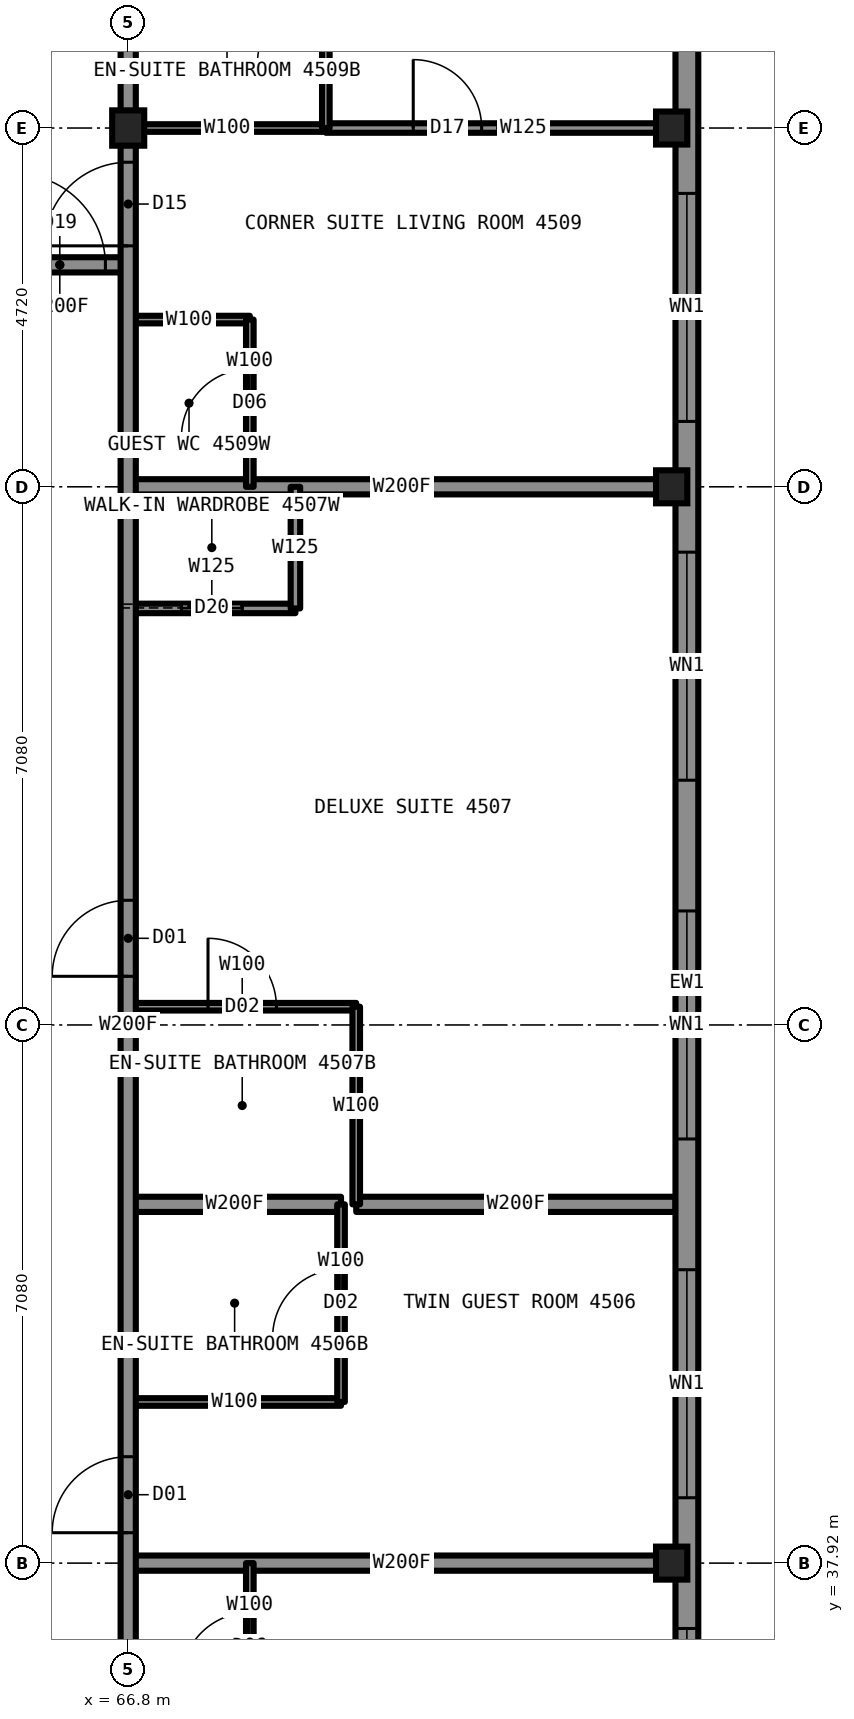
"""IFC4 building model, lengths in metres.
Left out: names, types, materials, properties, quantities, classifications, styles, units other than length and angle.
Written with IfcOpenShell. Run it as: python <this file> out.ifc"""

import sys

from ifc_helpers import new_model, si_unit, direction, frame, frame_2d, origin, origin_2d, place, context, subcontext, project, spatial, rectangle, i_section, extrude, element, fill, save


model = new_model("IFC4")
c1 = context("Model", 3, precision=1e-05, world=origin(), true_north=direction((0.0, 1.0)))
c2 = subcontext(c1, "Body", "Model", "MODEL_VIEW")
j1 = project(units=[si_unit("LENGTHUNIT", "METRE"), si_unit("PLANEANGLEUNIT", "RADIAN")], contexts=[c1])
p1 = place(None, origin())
s1 = spatial("IfcSite", under=j1, at=p1, CompositionType="ELEMENT")
p2 = place(p1, origin())
s2 = spatial("IfcBuilding", under=s1, at=p2, CompositionType="ELEMENT")
p3 = place(p2, frame((0.0, 0.0, 161.8)))
s3 = spatial("IfcBuildingStorey", under=s2, at=p3, CompositionType="ELEMENT", Elevation=161.8)
for number, where, z_axis, x_axis in (
    (1, (73.95, 37.92, 0.0), (0.0, 0.0, 1.0), (1.0, 0.0, 0.0)),
    (2, (73.95, 52.08, 0.0), (0.0, 0.0, 1.0), (1.0, 0.0, 0.0)),
    (3, (73.95, 56.8, 0.0), (0.0, 0.0, 1.0), (1.0, 0.0, 0.0)),
):
    element("IfcColumn", number, at=place(p3, frame(where, z_axis=z_axis, x_axis=x_axis)), inside=s3, PredefinedType="COLUMN", context=c2, shape_type="SweptSolid", body=[
        extrude(i_section(OverallWidth=0.442, OverallDepth=0.531, WebThickness=0.066, FlangeThickness=0.106, at=origin_2d()), origin(), (0.0, 0.0, 1.0), 3.5),
    ])
p4 = place(p3, frame((66.8, 56.8, 0.0), z_axis=(0.0, 0.0, 1.0), x_axis=(1.0, 0.0, 0.0)))
e4 = element("IfcColumn", 4, at=p4, inside=s3, PredefinedType="COLUMN", context=c2, shape_type="SweptSolid", body=[
    extrude(i_section(OverallWidth=0.422, OverallDepth=0.465, WebThickness=0.045, FlangeThickness=0.073, at=origin_2d()), origin(), (0.0, 0.0, 1.0), 3.5),
])
p5 = place(p3, frame((66.8, 42.64, 0.0), z_axis=(0.0, 0.0, 1.0), x_axis=(1.0, 0.0, 0.0)))
e5 = element("IfcWall", 5, at=p5, inside=s3, PredefinedType="PARTITIONING", context=c2, shape_type="SweptSolid", body=[
    extrude(rectangle(XDim=2.8, YDim=0.2, at=frame_2d((1.4, 0.0))), origin(), (0.0, 0.0, 1.0), 2.73),
])
p6 = place(p3, frame((69.8, 42.64, 0.0), z_axis=(0.0, 0.0, 1.0), x_axis=(1.0, 0.0, 0.0)))
e6 = element("IfcWall", 6, at=p6, inside=s3, PredefinedType="PARTITIONING", context=c2, shape_type="SweptSolid", body=[
    extrude(rectangle(XDim=4.2, YDim=0.2, at=frame_2d((2.1, 0.0))), origin(), (0.0, 0.0, 1.0), 2.73),
])
p7 = place(p3, frame((66.8, 40.04, 0.0), z_axis=(0.0, 0.0, 1.0), x_axis=(1.0, 0.0, 0.0)))
e7 = element("IfcWall", 7, at=p7, inside=s3, PredefinedType="PARTITIONING", context=c2, shape_type="SweptSolid", body=[
    extrude(rectangle(XDim=2.8, YDim=0.1, at=frame_2d((1.4, 0.0))), origin(), (0.0, 0.0, 1.0), 3.33),
])
p8 = place(p3, frame((66.8, 37.92, 0.0), z_axis=(0.0, 0.0, 1.0), x_axis=(1.0, 0.0, 0.0)))
e8 = element("IfcWall", 8, at=p8, inside=s3, PredefinedType="PARTITIONING", context=c2, shape_type="SweptSolid", body=[
    extrude(rectangle(XDim=7.2, YDim=0.2, at=frame_2d((3.6, 0.0))), origin(), (0.0, 0.0, 1.0), 2.573),
])
p9 = place(p3, frame((66.8, 45.24, 0.0), z_axis=(0.0, 0.0, 1.0), x_axis=(1.0, 0.0, 0.0)))
e9 = element("IfcWall", 9, at=p9, inside=s3, PredefinedType="PARTITIONING", context=c2, shape_type="SweptSolid", body=[
    extrude(rectangle(XDim=3.0, YDim=0.1, at=frame_2d((1.5, 0.0))), origin(), (0.0, 0.0, 1.0), 3.33),
])
p10 = place(p9, frame((1.05, 0.0, 0.0)))
e10 = element("IfcOpeningElement", 10, at=p10, cuts=e9, PredefinedType="OPENING", context=c2, shape_type="SweptSolid", body=[
    extrude(rectangle(XDim=0.9, YDim=2.1, at=frame_2d((0.45, 1.05))), frame((0.0, 0.06, 0.0), z_axis=(0.0, -1.0, 0.0), x_axis=(1.0, 0.0, 0.0)), (0.0, 0.0, 1.0), 0.12),
])
p11 = place(p3, frame((65.0, 55.0, 0.0), z_axis=(0.0, 0.0, 1.0), x_axis=(1.0, 0.0, 0.0)))
e11 = element("IfcWall", 11, at=p11, inside=s3, PredefinedType="PARTITIONING", context=c2, shape_type="SweptSolid", body=[
    extrude(rectangle(XDim=1.8, YDim=0.2, at=frame_2d((0.9, 0.0))), origin(), (0.0, 0.0, 1.0), 3.33),
])
p12 = place(p11, frame((0.3, 0.0, 0.0)))
e12 = element("IfcOpeningElement", 12, at=p12, cuts=e11, PredefinedType="OPENING", context=c2, shape_type="SweptSolid", body=[
    extrude(rectangle(XDim=1.2, YDim=2.2, at=frame_2d((0.6, 1.1))), frame((0.0, 0.11, 0.0), z_axis=(0.0, -1.0, 0.0), x_axis=(1.0, 0.0, 0.0)), (0.0, 0.0, 1.0), 0.22),
])
p13 = place(p3, frame((66.8, 56.8, 0.0), z_axis=(0.0, 0.0, 1.0), x_axis=(1.0, 0.0, 0.0)))
e13 = element("IfcWall", 13, at=p13, inside=s3, PredefinedType="PARTITIONING", context=c2, shape_type="SweptSolid", body=[
    extrude(rectangle(XDim=2.6, YDim=0.1, at=frame_2d((1.3, 0.0))), origin(), (0.0, 0.0, 1.0), 2.573),
])
p14 = place(p3, frame((69.4, 56.8, 0.0), z_axis=(0.0, 0.0, 1.0), x_axis=(1.0, 0.0, 0.0)))
e14 = element("IfcWall", 14, at=p14, inside=s3, PredefinedType="PARTITIONING", context=c2, shape_type="SweptSolid", body=[
    extrude(rectangle(XDim=4.6, YDim=0.125, at=frame_2d((2.3, 0.0))), origin(), (0.0, 0.0, 1.0), 2.573),
])
p15 = place(p14, frame((1.15, 0.0, 0.0)))
e15 = element("IfcOpeningElement", 15, at=p15, cuts=e14, PredefinedType="OPENING", context=c2, shape_type="SweptSolid", body=[
    extrude(rectangle(XDim=0.9, YDim=2.2, at=frame_2d((0.45, 1.1))), frame((0.0, 0.073, 0.0), z_axis=(0.0, -1.0, 0.0), x_axis=(1.0, 0.0, 0.0)), (0.0, 0.0, 1.0), 0.145),
])
p16 = place(p3, frame((66.8, 50.48, 0.0), z_axis=(0.0, 0.0, 1.0), x_axis=(1.0, 0.0, 0.0)))
e16 = element("IfcWall", 16, at=p16, inside=s3, PredefinedType="PARTITIONING", context=c2, shape_type="SweptSolid", body=[
    extrude(rectangle(XDim=2.2, YDim=0.125, at=frame_2d((1.1, 0.0))), origin(), (0.0, 0.0, 1.0), 3.33),
])
p17 = place(p16, frame((0.7, 0.0, 0.0)))
e17 = element("IfcOpeningElement", 17, at=p17, cuts=e16, PredefinedType="OPENING", context=c2, shape_type="SweptSolid", body=[
    extrude(rectangle(XDim=0.8, YDim=2.1, at=frame_2d((0.4, 1.05))), frame((0.0, 0.073, 0.0), z_axis=(0.0, -1.0, 0.0), x_axis=(1.0, 0.0, 0.0)), (0.0, 0.0, 1.0), 0.145),
])
p18 = place(p3, frame((66.8, 52.08, 0.0), z_axis=(0.0, 0.0, 1.0), x_axis=(1.0, 0.0, 0.0)))
e18 = element("IfcWall", 18, at=p18, inside=s3, PredefinedType="PARTITIONING", context=c2, shape_type="SweptSolid", body=[
    extrude(rectangle(XDim=7.2, YDim=0.2, at=frame_2d((3.6, 0.0))), origin(), (0.0, 0.0, 1.0), 2.573),
])
p19 = place(p3, frame((66.8, 54.28, 0.0), z_axis=(0.0, 0.0, 1.0), x_axis=(1.0, 0.0, 0.0)))
e19 = element("IfcWall", 19, at=p19, inside=s3, PredefinedType="PARTITIONING", context=c2, shape_type="SweptSolid", body=[
    extrude(rectangle(XDim=1.6, YDim=0.1, at=frame_2d((0.8, 0.0))), origin(), (0.0, 0.0, 1.0), 3.33),
])
p20 = place(p3, frame((66.8, 33.22, 0.0), z_axis=(0.0, 0.0, 1.0), x_axis=(0.0, 1.0, 0.0)))
e20 = element("IfcWall", 20, at=p20, inside=s3, PredefinedType="PARTITIONING", context=c2, shape_type="SweptSolid", body=[
    extrude(rectangle(XDim=23.56, YDim=0.2, at=frame_2d((11.78, 0.0))), origin(), (0.0, 0.0, 1.0), 3.33),
])
p21 = place(p20, frame((5.1, 0.0, 0.0)))
e21 = element("IfcOpeningElement", 21, at=p21, cuts=e20, PredefinedType="OPENING", context=c2, shape_type="SweptSolid", body=[
    extrude(rectangle(XDim=1.0, YDim=2.2, at=frame_2d((0.5, 1.1))), frame((0.0, 0.11, 0.0), z_axis=(0.0, -1.0, 0.0), x_axis=(1.0, 0.0, 0.0)), (0.0, 0.0, 1.0), 0.22),
])
p22 = place(p20, frame((12.42, 0.0, 0.0)))
e22 = element("IfcOpeningElement", 22, at=p22, cuts=e20, PredefinedType="OPENING", context=c2, shape_type="SweptSolid", body=[
    extrude(rectangle(XDim=1.0, YDim=2.2, at=frame_2d((0.5, 1.1))), frame((0.0, 0.11, 0.0), z_axis=(0.0, -1.0, 0.0), x_axis=(1.0, 0.0, 0.0)), (0.0, 0.0, 1.0), 0.22),
])
p23 = place(p20, frame((22.03, 0.0, 0.0)))
e23 = element("IfcOpeningElement", 23, at=p23, cuts=e20, PredefinedType="OPENING", context=c2, shape_type="SweptSolid", body=[
    extrude(rectangle(XDim=1.1, YDim=2.2, at=frame_2d((0.55, 1.1))), frame((0.0, 0.11, 0.0), z_axis=(0.0, -1.0, 0.0), x_axis=(1.0, 0.0, 0.0)), (0.0, 0.0, 1.0), 0.22),
])
p24 = place(p20, frame((0.63, 0.0, 0.0)))
e24 = element("IfcOpeningElement", 24, at=p24, cuts=e20, PredefinedType="OPENING", context=c2, shape_type="SweptSolid", body=[
    extrude(rectangle(XDim=1.1, YDim=2.2, at=frame_2d((0.55, 1.1))), frame((0.0, 0.11, 0.0), z_axis=(0.0, -1.0, 0.0), x_axis=(1.0, 0.0, 0.0)), (0.0, 0.0, 1.0), 0.22),
])
p25 = place(p3, frame((68.4, 35.72, 0.0), z_axis=(0.0, 0.0, 1.0), x_axis=(0.0, 1.0, 0.0)))
e25 = element("IfcWall", 25, at=p25, inside=s3, PredefinedType="PARTITIONING", context=c2, shape_type="SweptSolid", body=[
    extrude(rectangle(XDim=2.2, YDim=0.1, at=frame_2d((1.1, 0.0))), origin(), (0.0, 0.0, 1.0), 3.33),
])
p26 = place(p25, frame((0.65, 0.0, 0.0)))
e26 = element("IfcOpeningElement", 26, at=p26, cuts=e25, PredefinedType="OPENING", context=c2, shape_type="SweptSolid", body=[
    extrude(rectangle(XDim=0.9, YDim=2.1, at=frame_2d((0.45, 1.05))), frame((0.0, 0.06, 0.0), z_axis=(0.0, -1.0, 0.0), x_axis=(1.0, 0.0, 0.0)), (0.0, 0.0, 1.0), 0.12),
])
p27 = place(p3, frame((68.4, 52.08, 0.0), z_axis=(0.0, 0.0, 1.0), x_axis=(0.0, 1.0, 0.0)))
e27 = element("IfcWall", 27, at=p27, inside=s3, PredefinedType="PARTITIONING", context=c2, shape_type="SweptSolid", body=[
    extrude(rectangle(XDim=2.2, YDim=0.1, at=frame_2d((1.1, 0.0))), origin(), (0.0, 0.0, 1.0), 3.33),
])
p28 = place(p27, frame((0.65, 0.0, 0.0)))
e28 = element("IfcOpeningElement", 28, at=p28, cuts=e27, PredefinedType="OPENING", context=c2, shape_type="SweptSolid", body=[
    extrude(rectangle(XDim=0.9, YDim=2.1, at=frame_2d((0.45, 1.05))), frame((0.0, 0.06, 0.0), z_axis=(0.0, -1.0, 0.0), x_axis=(1.0, 0.0, 0.0)), (0.0, 0.0, 1.0), 0.12),
])
p29 = place(p3, frame((69.0, 50.48, 0.0), z_axis=(0.0, 0.0, 1.0), x_axis=(0.0, 1.0, 0.0)))
e29 = element("IfcWall", 29, at=p29, inside=s3, PredefinedType="PARTITIONING", context=c2, shape_type="SweptSolid", body=[
    extrude(rectangle(XDim=1.6, YDim=0.125, at=frame_2d((0.8, 0.0))), origin(), (0.0, 0.0, 1.0), 3.33),
])
p30 = place(p3, frame((69.4, 56.8, 0.0), z_axis=(0.0, 0.0, 1.0), x_axis=(0.0, 1.0, 0.0)))
e30 = element("IfcWall", 30, at=p30, inside=s3, PredefinedType="PARTITIONING", context=c2, shape_type="SweptSolid", body=[
    extrude(rectangle(XDim=2.6, YDim=0.1, at=frame_2d((1.3, 0.0))), origin(), (0.0, 0.0, 1.0), 3.33),
])
p31 = place(p30, frame((0.85, 0.0, 0.0)))
e31 = element("IfcOpeningElement", 31, at=p31, cuts=e30, PredefinedType="OPENING", context=c2, shape_type="SweptSolid", body=[
    extrude(rectangle(XDim=0.9, YDim=2.1, at=frame_2d((0.45, 1.05))), frame((0.0, 0.06, 0.0), z_axis=(0.0, -1.0, 0.0), x_axis=(1.0, 0.0, 0.0)), (0.0, 0.0, 1.0), 0.12),
])
p32 = place(p3, frame((69.6, 40.04, 0.0), z_axis=(0.0, 0.0, 1.0), x_axis=(0.0, 1.0, 0.0)))
e32 = element("IfcWall", 32, at=p32, inside=s3, PredefinedType="PARTITIONING", context=c2, shape_type="SweptSolid", body=[
    extrude(rectangle(XDim=2.6, YDim=0.1, at=frame_2d((1.3, 0.0))), origin(), (0.0, 0.0, 1.0), 3.33),
])
p33 = place(p32, frame((0.85, 0.0, 0.0)))
e33 = element("IfcOpeningElement", 33, at=p33, cuts=e32, PredefinedType="OPENING", context=c2, shape_type="SweptSolid", body=[
    extrude(rectangle(XDim=0.9, YDim=2.1, at=frame_2d((0.45, 1.05))), frame((0.0, 0.06, 0.0), z_axis=(0.0, -1.0, 0.0), x_axis=(1.0, 0.0, 0.0)), (0.0, 0.0, 1.0), 0.12),
])
p34 = place(p3, frame((69.8, 42.64, 0.0), z_axis=(0.0, 0.0, 1.0), x_axis=(0.0, 1.0, 0.0)))
e34 = element("IfcWall", 34, at=p34, inside=s3, PredefinedType="PARTITIONING", context=c2, shape_type="SweptSolid", body=[
    extrude(rectangle(XDim=2.6, YDim=0.1, at=frame_2d((1.3, 0.0))), origin(), (0.0, 0.0, 1.0), 3.33),
])
p35 = place(p3, frame((74.15, 31.2, 0.0), z_axis=(0.0, 0.0, 1.0), x_axis=(0.0, 1.0, 0.0)))
e35 = element("IfcWall", 35, at=p35, inside=s3, PredefinedType="SOLIDWALL", context=c2, shape_type="SweptSolid", body=[
    extrude(rectangle(XDim=27.6, YDim=0.3, at=frame_2d((13.8, 0.0))), origin(), (0.0, 0.0, 1.0), 2.83),
])
p36 = place(p35, frame((2.86, 0.0, 0.3)))
e36 = element("IfcOpeningElement", 36, at=p36, cuts=e35, PredefinedType="OPENING", context=c2, shape_type="SweptSolid", body=[
    extrude(rectangle(XDim=3.0, YDim=2.0, at=frame_2d((1.5, 1.0))), frame((0.0, 0.16, 0.0), z_axis=(0.0, -1.0, 0.0), x_axis=(1.0, 0.0, 0.0)), (0.0, 0.0, 1.0), 0.32),
])
p37 = place(p35, frame((7.58, 0.0, 0.3)))
e37 = element("IfcOpeningElement", 37, at=p37, cuts=e35, PredefinedType="OPENING", context=c2, shape_type="SweptSolid", body=[
    extrude(rectangle(XDim=3.0, YDim=2.0, at=frame_2d((1.5, 1.0))), frame((0.0, 0.16, 0.0), z_axis=(0.0, -1.0, 0.0), x_axis=(1.0, 0.0, 0.0)), (0.0, 0.0, 1.0), 0.32),
])
p38 = place(p35, frame((12.3, 0.0, 0.3)))
e38 = element("IfcOpeningElement", 38, at=p38, cuts=e35, PredefinedType="OPENING", context=c2, shape_type="SweptSolid", body=[
    extrude(rectangle(XDim=3.0, YDim=2.0, at=frame_2d((1.5, 1.0))), frame((0.0, 0.16, 0.0), z_axis=(0.0, -1.0, 0.0), x_axis=(1.0, 0.0, 0.0)), (0.0, 0.0, 1.0), 0.32),
])
p39 = place(p35, frame((17.02, 0.0, 0.3)))
e39 = element("IfcOpeningElement", 39, at=p39, cuts=e35, PredefinedType="OPENING", context=c2, shape_type="SweptSolid", body=[
    extrude(rectangle(XDim=3.0, YDim=2.0, at=frame_2d((1.5, 1.0))), frame((0.0, 0.16, 0.0), z_axis=(0.0, -1.0, 0.0), x_axis=(1.0, 0.0, 0.0)), (0.0, 0.0, 1.0), 0.32),
])
p40 = place(p35, frame((21.74, 0.0, 0.3)))
e40 = element("IfcOpeningElement", 40, at=p40, cuts=e35, PredefinedType="OPENING", context=c2, shape_type="SweptSolid", body=[
    extrude(rectangle(XDim=3.0, YDim=2.0, at=frame_2d((1.5, 1.0))), frame((0.0, 0.16, 0.0), z_axis=(0.0, -1.0, 0.0), x_axis=(1.0, 0.0, 0.0)), (0.0, 0.0, 1.0), 0.32),
])
p41 = place(p3, frame((66.8, 56.78, 0.0), z_axis=(0.0, 0.0, 1.0), x_axis=(0.0, 1.0, 0.0)))
e41 = element("IfcWall", 41, at=p41, inside=s3, PredefinedType="PARTITIONING", context=c2, shape_type="SweptSolid", body=[
    extrude(rectangle(XDim=2.62, YDim=0.2, at=frame_2d((1.31, 0.0))), origin(), (0.0, 0.0, 1.0), 2.573),
])
p42 = place(p12, origin())
e42 = element("IfcDoor", 42, at=p42, inside=s3, OperationType="SINGLE_SWING_LEFT", PredefinedType="DOOR", context=c2, shape_type="SweptSolid", body=[
    extrude(rectangle(XDim=1.2, YDim=2.2, at=frame_2d((0.6, 1.1))), frame((0.0, 0.025, 0.0), z_axis=(0.0, -1.0, 0.0), x_axis=(1.0, 0.0, 0.0)), (0.0, 0.0, 1.0), 0.05),
])
fill(e12, e42)
p43 = place(p21, origin())
e43 = element("IfcDoor", 43, at=p43, inside=s3, OperationType="SINGLE_SWING_LEFT", PredefinedType="DOOR", context=c2, shape_type="SweptSolid", body=[
    extrude(rectangle(XDim=1.0, YDim=2.2, at=frame_2d((0.5, 1.1))), frame((0.0, 0.025, 0.0), z_axis=(0.0, -1.0, 0.0), x_axis=(1.0, 0.0, 0.0)), (0.0, 0.0, 1.0), 0.05),
])
fill(e21, e43)
p44 = place(p33, origin())
e44 = element("IfcDoor", 44, at=p44, inside=s3, OperationType="SINGLE_SWING_RIGHT", PredefinedType="DOOR", context=c2, shape_type="SweptSolid", body=[
    extrude(rectangle(XDim=0.9, YDim=2.1, at=frame_2d((0.45, 1.05))), frame((0.0, 0.025, 0.0), z_axis=(0.0, -1.0, 0.0), x_axis=(1.0, 0.0, 0.0)), (0.0, 0.0, 1.0), 0.05),
])
fill(e33, e44)
p45 = place(p22, origin())
e45 = element("IfcDoor", 45, at=p45, inside=s3, OperationType="SINGLE_SWING_LEFT", PredefinedType="DOOR", context=c2, shape_type="SweptSolid", body=[
    extrude(rectangle(XDim=1.0, YDim=2.2, at=frame_2d((0.5, 1.1))), frame((0.0, 0.025, 0.0), z_axis=(0.0, -1.0, 0.0), x_axis=(1.0, 0.0, 0.0)), (0.0, 0.0, 1.0), 0.05),
])
fill(e22, e45)
p46 = place(p10, origin())
e46 = element("IfcDoor", 46, at=p46, inside=s3, OperationType="SINGLE_SWING_RIGHT", PredefinedType="DOOR", context=c2, shape_type="SweptSolid", body=[
    extrude(rectangle(XDim=0.9, YDim=2.1, at=frame_2d((0.45, 1.05))), frame((0.0, 0.025, 0.0), z_axis=(0.0, -1.0, 0.0), x_axis=(1.0, 0.0, 0.0)), (0.0, 0.0, 1.0), 0.05),
])
fill(e10, e46)
p47 = place(p17, origin())
e47 = element("IfcDoor", 47, at=p47, inside=s3, OperationType="SLIDING_TO_LEFT", PredefinedType="DOOR", context=c2, shape_type="SweptSolid", body=[
    extrude(rectangle(XDim=0.8, YDim=2.1, at=frame_2d((0.4, 1.05))), frame((0.0, 0.025, 0.0), z_axis=(0.0, -1.0, 0.0), x_axis=(1.0, 0.0, 0.0)), (0.0, 0.0, 1.0), 0.05),
])
fill(e17, e47)
p48 = place(p23, origin())
e48 = element("IfcDoor", 48, at=p48, inside=s3, OperationType="SINGLE_SWING_LEFT", PredefinedType="DOOR", context=c2, shape_type="SweptSolid", body=[
    extrude(rectangle(XDim=1.1, YDim=2.2, at=frame_2d((0.55, 1.1))), frame((0.0, 0.025, 0.0), z_axis=(0.0, -1.0, 0.0), x_axis=(1.0, 0.0, 0.0)), (0.0, 0.0, 1.0), 0.05),
])
fill(e23, e48)
p49 = place(p31, origin())
e49 = element("IfcDoor", 49, at=p49, inside=s3, OperationType="SINGLE_SWING_RIGHT", PredefinedType="DOOR", context=c2, shape_type="SweptSolid", body=[
    extrude(rectangle(XDim=0.9, YDim=2.1, at=frame_2d((0.45, 1.05))), frame((0.0, 0.025, 0.0), z_axis=(0.0, -1.0, 0.0), x_axis=(1.0, 0.0, 0.0)), (0.0, 0.0, 1.0), 0.05),
])
fill(e31, e49)
p50 = place(p15, origin())
e50 = element("IfcDoor", 50, at=p50, inside=s3, OperationType="SINGLE_SWING_LEFT", PredefinedType="DOOR", context=c2, shape_type="SweptSolid", body=[
    extrude(rectangle(XDim=0.9, YDim=2.2, at=frame_2d((0.45, 1.1))), frame((0.0, 0.025, 0.0), z_axis=(0.0, -1.0, 0.0), x_axis=(1.0, 0.0, 0.0)), (0.0, 0.0, 1.0), 0.05),
])
fill(e15, e50)
p51 = place(p28, origin())
e51 = element("IfcDoor", 51, at=p51, inside=s3, OperationType="SINGLE_SWING_LEFT", PredefinedType="DOOR", context=c2, shape_type="SweptSolid", body=[
    extrude(rectangle(XDim=0.9, YDim=2.1, at=frame_2d((0.45, 1.05))), frame((0.0, 0.025, 0.0), z_axis=(0.0, -1.0, 0.0), x_axis=(1.0, 0.0, 0.0)), (0.0, 0.0, 1.0), 0.05),
])
fill(e28, e51)
p52 = place(p26, origin())
e52 = element("IfcDoor", 52, at=p52, inside=s3, OperationType="SINGLE_SWING_LEFT", PredefinedType="DOOR", context=c2, shape_type="SweptSolid", body=[
    extrude(rectangle(XDim=0.9, YDim=2.1, at=frame_2d((0.45, 1.05))), frame((0.0, 0.025, 0.0), z_axis=(0.0, -1.0, 0.0), x_axis=(1.0, 0.0, 0.0)), (0.0, 0.0, 1.0), 0.05),
])
fill(e26, e52)
p53 = place(p36, origin())
e53 = element("IfcWindow", 53, at=p53, inside=s3, PartitioningType="SINGLE_PANEL", PredefinedType="WINDOW", context=c2, shape_type="SweptSolid", body=[
    extrude(rectangle(XDim=3.0, YDim=2.0, at=frame_2d((1.5, 1.0))), frame((0.0, 0.13, 0.0), z_axis=(0.0, -1.0, 0.0), x_axis=(1.0, 0.0, 0.0)), (0.0, 0.0, 1.0), 0.06),
])
fill(e36, e53)
p54 = place(p37, origin())
e54 = element("IfcWindow", 54, at=p54, inside=s3, PartitioningType="SINGLE_PANEL", PredefinedType="WINDOW", context=c2, shape_type="SweptSolid", body=[
    extrude(rectangle(XDim=3.0, YDim=2.0, at=frame_2d((1.5, 1.0))), frame((0.0, 0.13, 0.0), z_axis=(0.0, -1.0, 0.0), x_axis=(1.0, 0.0, 0.0)), (0.0, 0.0, 1.0), 0.06),
])
fill(e37, e54)
p55 = place(p38, origin())
e55 = element("IfcWindow", 55, at=p55, inside=s3, PartitioningType="SINGLE_PANEL", PredefinedType="WINDOW", context=c2, shape_type="SweptSolid", body=[
    extrude(rectangle(XDim=3.0, YDim=2.0, at=frame_2d((1.5, 1.0))), frame((0.0, 0.13, 0.0), z_axis=(0.0, -1.0, 0.0), x_axis=(1.0, 0.0, 0.0)), (0.0, 0.0, 1.0), 0.06),
])
fill(e38, e55)
p56 = place(p39, origin())
e56 = element("IfcWindow", 56, at=p56, inside=s3, PartitioningType="SINGLE_PANEL", PredefinedType="WINDOW", context=c2, shape_type="SweptSolid", body=[
    extrude(rectangle(XDim=3.0, YDim=2.0, at=frame_2d((1.5, 1.0))), frame((0.0, 0.13, 0.0), z_axis=(0.0, -1.0, 0.0), x_axis=(1.0, 0.0, 0.0)), (0.0, 0.0, 1.0), 0.06),
])
fill(e39, e56)
p57 = place(p40, origin())
e57 = element("IfcWindow", 57, at=p57, inside=s3, PartitioningType="SINGLE_PANEL", PredefinedType="WINDOW", context=c2, shape_type="SweptSolid", body=[
    extrude(rectangle(XDim=3.0, YDim=2.0, at=frame_2d((1.5, 1.0))), frame((0.0, 0.13, 0.0), z_axis=(0.0, -1.0, 0.0), x_axis=(1.0, 0.0, 0.0)), (0.0, 0.0, 1.0), 0.06),
])
fill(e40, e57)
save(model, sys.argv[1])
